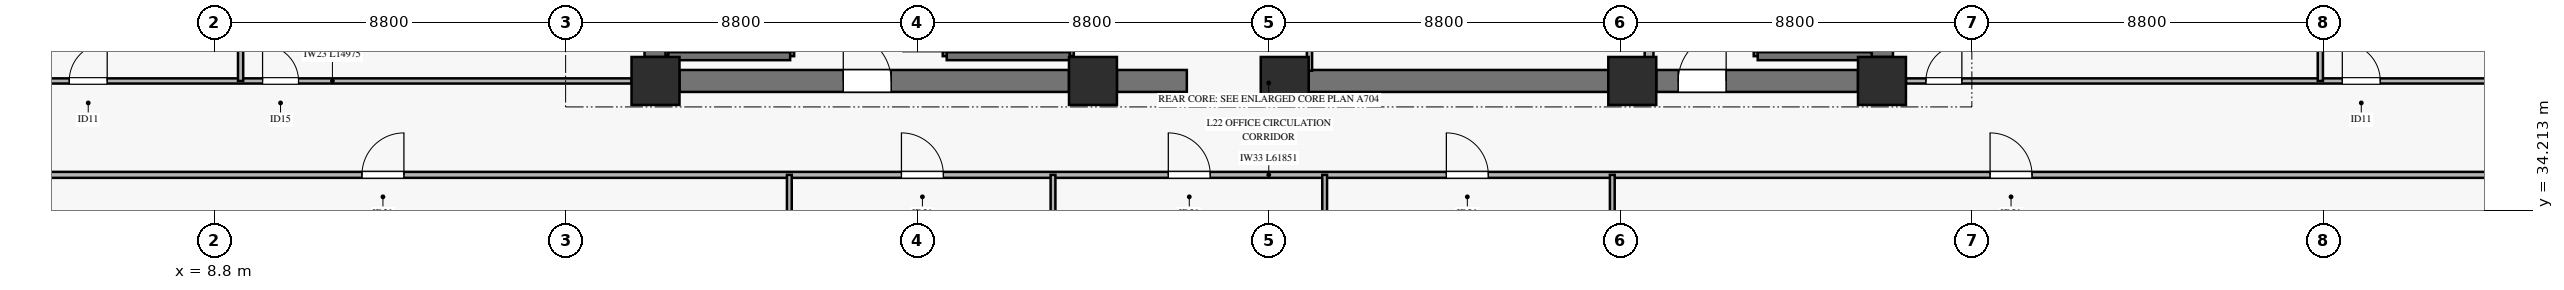
"""IFC4 building model, lengths in metres.
Left out: names, types, materials, properties, quantities, classifications, styles, units other than length and angle.
Written with IfcOpenShell. Run it as: python <this file> out.ifc"""

import sys

from ifc_helpers import new_model, si_unit, direction, frame, frame_2d, origin, origin_2d, place, context, subcontext, project, spatial, rectangle, extrude, source, transform, mapped, element, fill, save


model = new_model("IFC4")
c1 = context("Model", 3, precision=1e-05, world=origin(), true_north=direction((0.0, 1.0)))
c2 = subcontext(c1, "Body", "Model", "MODEL_VIEW")
j1 = project(units=[si_unit("LENGTHUNIT", "METRE"), si_unit("PLANEANGLEUNIT", "RADIAN")], contexts=[c1])
p1 = place(None, origin())
s1 = spatial("IfcSite", under=j1, at=p1, CompositionType="ELEMENT")
p2 = place(p1, origin())
s2 = spatial("IfcBuilding", under=s1, at=p2, CompositionType="ELEMENT")
p3 = place(p2, frame((0.0, 0.0, 91.3)))
s3 = spatial("IfcBuildingStorey", under=s2, at=p3, CompositionType="ELEMENT", Elevation=91.3)
m1 = source(origin(), c2, "Body", "SweptSolid", [
    extrude(rectangle(XDim=1.2, YDim=1.2, at=origin_2d()), origin(), (0.0, 0.0, 1.0), 3.62),
])
for number, where, z_axis, x_axis in (
    (1, (19.85, 37.45, 0.0), (0.0, 0.0, 1.0), (1.0, 0.0, 0.0)),
    (2, (30.8, 37.45, 0.0), (0.0, 0.0, 1.0), (1.0, 0.0, 0.0)),
    (3, (35.6, 37.45, 0.0), (0.0, 0.0, 1.0), (1.0, 0.0, 0.0)),
    (4, (44.3, 37.45, 0.0), (0.0, 0.0, 1.0), (1.0, 0.0, 0.0)),
    (5, (50.55, 37.45, 0.0), (0.0, 0.0, 1.0), (1.0, 0.0, 0.0)),
):
    element("IfcColumn", number, at=place(p3, frame(where, z_axis=z_axis, x_axis=x_axis)), inside=s3, PredefinedType="PILASTER", context=c2, shape_type="MappedRepresentation", body=[
        mapped(m1, transform((0.0, 0.0, 0.0), x_axis=(1.0, 0.0, 0.0), y_axis=(0.0, 1.0, 0.0), z_axis=(0.0, 0.0, 1.0), scale=1.0)),
    ])
p4 = place(p3, frame((20.45, 37.45, 0.0), z_axis=(0.0, 0.0, 1.0), x_axis=(1.0, 0.0, 0.0)))
e6 = element("IfcWall", 6, at=p4, inside=s3, PredefinedType="SHEAR", context=c2, shape_type="SweptSolid", body=[
    extrude(rectangle(XDim=9.75, YDim=0.55, at=frame_2d((4.875, 0.0))), origin(), (0.0, 0.0, 1.0), 3.62),
])
p5 = place(p4, frame((4.1, 0.0, 0.0)))
e7 = element("IfcOpeningElement", 7, at=p5, cuts=e6, PredefinedType="OPENING", context=c2, shape_type="SweptSolid", body=[
    extrude(rectangle(XDim=1.2, YDim=2.15, at=frame_2d((0.6, 1.075))), frame((0.0, 0.285, 0.0), z_axis=(0.0, -1.0, 0.0), x_axis=(1.0, 0.0, 0.0)), (0.0, 0.0, 1.0), 0.57),
])
p6 = place(p3, frame((31.4, 37.45, 0.0), z_axis=(0.0, 0.0, 1.0), x_axis=(1.0, 0.0, 0.0)))
e8 = element("IfcWall", 8, at=p6, inside=s3, PredefinedType="SHEAR", context=c2, shape_type="SweptSolid", body=[
    extrude(rectangle(XDim=1.75, YDim=0.55, at=frame_2d((0.875, 0.0))), origin(), (0.0, 0.0, 1.0), 3.62),
])
p7 = place(p3, frame((36.2, 37.45, 0.0), z_axis=(0.0, 0.0, 1.0), x_axis=(1.0, 0.0, 0.0)))
e9 = element("IfcWall", 9, at=p7, inside=s3, PredefinedType="SHEAR", context=c2, shape_type="SweptSolid", body=[
    extrude(rectangle(XDim=7.5, YDim=0.55, at=frame_2d((3.75, 0.0))), origin(), (0.0, 0.0, 1.0), 3.62),
])
p8 = place(p3, frame((44.9, 37.45, 0.0), z_axis=(0.0, 0.0, 1.0), x_axis=(1.0, 0.0, 0.0)))
e10 = element("IfcWall", 10, at=p8, inside=s3, PredefinedType="SHEAR", context=c2, shape_type="SweptSolid", body=[
    extrude(rectangle(XDim=5.05, YDim=0.55, at=frame_2d((2.525, 0.0))), origin(), (0.0, 0.0, 1.0), 3.62),
])
p9 = place(p8, frame((0.55, 0.0, 0.0)))
e11 = element("IfcOpeningElement", 11, at=p9, cuts=e10, PredefinedType="OPENING", context=c2, shape_type="SweptSolid", body=[
    extrude(rectangle(XDim=1.2, YDim=2.15, at=frame_2d((0.6, 1.075))), frame((0.0, 0.285, 0.0), z_axis=(0.0, -1.0, 0.0), x_axis=(1.0, 0.0, 0.0)), (0.0, 0.0, 1.0), 0.57),
])
for number, where, z_axis, x_axis in (
    (12, (19.85, 38.05, 0.0), (0.0, 0.0, 1.0), (0.0, 1.0, 0.0)),
    (13, (50.55, 38.05, 0.0), (0.0, 0.0, 1.0), (0.0, 1.0, 0.0)),
):
    element("IfcWall", number, at=place(p3, frame(where, z_axis=z_axis, x_axis=x_axis)), inside=s3, PredefinedType="SHEAR", context=c2, shape_type="SweptSolid", body=[
        extrude(rectangle(XDim=7.9, YDim=0.55, at=frame_2d((3.95, 0.0))), origin(), (0.0, 0.0, 1.0), 3.62),
    ])
p10 = place(p3, frame((20.17, 38.07, 0.0), z_axis=(0.0, 0.0, 1.0), x_axis=(0.0, 1.0, 0.0)))
e14 = element("IfcWall", 14, at=p10, inside=s3, PredefinedType="SOLIDWALL", context=c2, shape_type="SweptSolid", body=[
    extrude(rectangle(XDim=7.25, YDim=0.14, at=frame_2d((3.625, 0.0))), origin(), (0.0, 0.0, 1.0), 3.9),
])
p11 = place(p3, frame((23.22, 38.07, 0.0), z_axis=(0.0, 0.0, 1.0), x_axis=(0.0, 1.0, 0.0)))
e15 = element("IfcWall", 15, at=p11, inside=s3, PredefinedType="SOLIDWALL", context=c2, shape_type="SweptSolid", body=[
    extrude(rectangle(XDim=7.25, YDim=0.2, at=frame_2d((3.625, 0.0))), origin(), (0.0, 0.0, 1.0), 3.9),
])
p12 = place(p11, frame((0.11, 0.0, 0.0)))
e16 = element("IfcOpeningElement", 16, at=p12, cuts=e15, PredefinedType="OPENING", context=c2, shape_type="SweptSolid", body=[
    extrude(rectangle(XDim=1.1, YDim=2.15, at=frame_2d((0.55, 1.075))), frame((0.0, 0.11, 0.0), z_axis=(0.0, -1.0, 0.0), x_axis=(1.0, 0.0, 0.0)), (0.0, 0.0, 1.0), 0.22),
])
p13 = place(p3, frame((20.17, 38.07, 0.0), z_axis=(0.0, 0.0, 1.0), x_axis=(1.0, 0.0, 0.0)))
e17 = element("IfcWall", 17, at=p13, inside=s3, PredefinedType="SOLIDWALL", context=c2, shape_type="SweptSolid", body=[
    extrude(rectangle(XDim=3.05, YDim=0.2, at=frame_2d((1.525, 0.0))), origin(), (0.0, 0.0, 1.0), 3.9),
])
p14 = place(p3, frame((27.14, 38.07, 0.0), z_axis=(0.0, 0.0, 1.0), x_axis=(0.0, 1.0, 0.0)))
e18 = element("IfcWall", 18, at=p14, inside=s3, PredefinedType="SOLIDWALL", context=c2, shape_type="SweptSolid", body=[
    extrude(rectangle(XDim=7.25, YDim=0.2, at=frame_2d((3.625, 0.0))), origin(), (0.0, 0.0, 1.0), 3.9),
])
p15 = place(p14, frame((0.11, 0.0, 0.0)))
e19 = element("IfcOpeningElement", 19, at=p15, cuts=e18, PredefinedType="OPENING", context=c2, shape_type="SweptSolid", body=[
    extrude(rectangle(XDim=1.1, YDim=2.15, at=frame_2d((0.55, 1.075))), frame((0.0, 0.11, 0.0), z_axis=(0.0, -1.0, 0.0), x_axis=(1.0, 0.0, 0.0)), (0.0, 0.0, 1.0), 0.22),
])
p16 = place(p3, frame((30.22, 38.07, 0.0), z_axis=(0.0, 0.0, 1.0), x_axis=(0.0, 1.0, 0.0)))
e20 = element("IfcWall", 20, at=p16, inside=s3, PredefinedType="SOLIDWALL", context=c2, shape_type="SweptSolid", body=[
    extrude(rectangle(XDim=7.25, YDim=0.2, at=frame_2d((3.625, 0.0))), origin(), (0.0, 0.0, 1.0), 3.9),
])
p17 = place(p3, frame((27.14, 38.07, 0.0), z_axis=(0.0, 0.0, 1.0), x_axis=(1.0, 0.0, 0.0)))
e21 = element("IfcWall", 21, at=p17, inside=s3, PredefinedType="SOLIDWALL", context=c2, shape_type="SweptSolid", body=[
    extrude(rectangle(XDim=3.08, YDim=0.2, at=frame_2d((1.54, 0.0))), origin(), (0.0, 0.0, 1.0), 3.9),
])
p18 = place(p3, frame((47.44, 38.07, 0.0), z_axis=(0.0, 0.0, 1.0), x_axis=(0.0, 1.0, 0.0)))
e22 = element("IfcWall", 22, at=p18, inside=s3, PredefinedType="SOLIDWALL", context=c2, shape_type="SweptSolid", body=[
    extrude(rectangle(XDim=7.25, YDim=0.2, at=frame_2d((3.625, 0.0))), origin(), (0.0, 0.0, 1.0), 3.9),
])
p19 = place(p18, frame((0.11, 0.0, 0.0)))
e23 = element("IfcOpeningElement", 23, at=p19, cuts=e22, PredefinedType="OPENING", context=c2, shape_type="SweptSolid", body=[
    extrude(rectangle(XDim=1.1, YDim=2.15, at=frame_2d((0.55, 1.075))), frame((0.0, 0.11, 0.0), z_axis=(0.0, -1.0, 0.0), x_axis=(1.0, 0.0, 0.0)), (0.0, 0.0, 1.0), 0.22),
])
p20 = place(p3, frame((47.44, 38.07, 0.0), z_axis=(0.0, 0.0, 1.0), x_axis=(1.0, 0.0, 0.0)))
e24 = element("IfcWall", 24, at=p20, inside=s3, PredefinedType="SOLIDWALL", context=c2, shape_type="SweptSolid", body=[
    extrude(rectangle(XDim=2.855, YDim=0.2, at=frame_2d((1.427, 0.0))), origin(), (0.0, 0.0, 1.0), 3.9),
])
p21 = place(p3, frame((44.72, 37.705, 0.0), z_axis=(0.0, 0.0, 1.0), x_axis=(0.0, 1.0, 0.0)))
e25 = element("IfcWall", 25, at=p21, inside=s3, PredefinedType="SOLIDWALL", context=c2, shape_type="SweptSolid", body=[
    extrude(rectangle(XDim=7.515, YDim=0.22, at=frame_2d((3.757, 0.0))), origin(), (0.0, 0.0, 1.0), 3.62),
])
p22 = place(p3, frame((36.22, 37.705, 0.0), z_axis=(0.0, 0.0, 1.0), x_axis=(0.0, 1.0, 0.0)))
e26 = element("IfcWall", 26, at=p22, inside=s3, PredefinedType="PARTITIONING", context=c2, shape_type="SweptSolid", body=[
    extrude(rectangle(XDim=2.215, YDim=0.13, at=frame_2d((1.107, 0.0))), origin(), (0.0, 0.0, 1.0), 3.62),
])
p23 = place(p22, frame((0.905, 0.0, 0.0)))
e27 = element("IfcOpeningElement", 27, at=p23, cuts=e26, PredefinedType="OPENING", context=c2, shape_type="SweptSolid", body=[
    extrude(rectangle(XDim=0.9, YDim=2.1, at=frame_2d((0.45, 1.05))), frame((0.0, 0.075, 0.0), z_axis=(0.0, -1.0, 0.0), x_axis=(1.0, 0.0, 0.0)), (0.0, 0.0, 1.0), 0.15),
])
p24 = place(p3, frame((4.275, 35.1, 0.0), z_axis=(0.0, 0.0, 1.0), x_axis=(1.0, 0.0, 0.0)))
e28 = element("IfcWall", 28, at=p24, inside=s3, PredefinedType="PARTITIONING", context=c2, shape_type="SweptSolid", body=[
    extrude(rectangle(XDim=61.851, YDim=0.15, at=frame_2d((30.926, 0.0))), origin(), (0.0, 0.0, 1.0), 2.705),
])
p25 = place(p24, frame((8.227, 0.0, 0.0)))
e29 = element("IfcOpeningElement", 29, at=p25, cuts=e28, PredefinedType="OPENING", context=c2, shape_type="SweptSolid", body=[
    extrude(rectangle(XDim=1.05, YDim=2.15, at=frame_2d((0.525, 1.075))), frame((0.0, 0.085, 0.0), z_axis=(0.0, -1.0, 0.0), x_axis=(1.0, 0.0, 0.0)), (0.0, 0.0, 1.0), 0.17),
])
p26 = place(p24, frame((21.731, 0.0, 0.0)))
e30 = element("IfcOpeningElement", 30, at=p26, cuts=e28, PredefinedType="OPENING", context=c2, shape_type="SweptSolid", body=[
    extrude(rectangle(XDim=1.05, YDim=2.15, at=frame_2d((0.525, 1.075))), frame((0.0, 0.085, 0.0), z_axis=(0.0, -1.0, 0.0), x_axis=(1.0, 0.0, 0.0)), (0.0, 0.0, 1.0), 0.17),
])
p27 = place(p24, frame((28.411, 0.0, 0.0)))
e31 = element("IfcOpeningElement", 31, at=p27, cuts=e28, PredefinedType="OPENING", context=c2, shape_type="SweptSolid", body=[
    extrude(rectangle(XDim=1.05, YDim=2.15, at=frame_2d((0.525, 1.075))), frame((0.0, 0.085, 0.0), z_axis=(0.0, -1.0, 0.0), x_axis=(1.0, 0.0, 0.0)), (0.0, 0.0, 1.0), 0.17),
])
p28 = place(p24, frame((35.371, 0.0, 0.0)))
e32 = element("IfcOpeningElement", 32, at=p28, cuts=e28, PredefinedType="OPENING", context=c2, shape_type="SweptSolid", body=[
    extrude(rectangle(XDim=1.05, YDim=2.15, at=frame_2d((0.525, 1.075))), frame((0.0, 0.085, 0.0), z_axis=(0.0, -1.0, 0.0), x_axis=(1.0, 0.0, 0.0)), (0.0, 0.0, 1.0), 0.17),
])
p29 = place(p24, frame((48.981, 0.0, 0.0)))
e33 = element("IfcOpeningElement", 33, at=p29, cuts=e28, PredefinedType="OPENING", context=c2, shape_type="SweptSolid", body=[
    extrude(rectangle(XDim=1.05, YDim=2.15, at=frame_2d((0.525, 1.075))), frame((0.0, 0.085, 0.0), z_axis=(0.0, -1.0, 0.0), x_axis=(1.0, 0.0, 0.0)), (0.0, 0.0, 1.0), 0.17),
])
for number, where, z_axis, x_axis in (
    (34, (23.2, 5.936, 0.0), (0.0, 0.0, 1.0), (0.0, 1.0, 0.0)),
    (35, (29.8, 5.936, 0.0), (0.0, 0.0, 1.0), (0.0, 1.0, 0.0)),
    (36, (36.6, 5.936, 0.0), (0.0, 0.0, 1.0), (0.0, 1.0, 0.0)),
):
    element("IfcWall", number, at=place(p3, frame(where, z_axis=z_axis, x_axis=x_axis)), inside=s3, PredefinedType="PARTITIONING", context=c2, shape_type="SweptSolid", body=[
        extrude(rectangle(XDim=29.164, YDim=0.12, at=frame_2d((14.582, 0.0))), origin(), (0.0, 0.0, 1.0), 3.105),
    ])
p30 = place(p3, frame((43.8, 5.936, 0.0), z_axis=(0.0, 0.0, 1.0), x_axis=(0.0, 1.0, 0.0)))
e37 = element("IfcWall", 37, at=p30, inside=s3, PredefinedType="PARTITIONING", context=c2, shape_type="SweptSolid", body=[
    extrude(rectangle(XDim=29.164, YDim=0.12, at=frame_2d((14.582, 0.0))), origin(), (0.0, 0.0, 1.0), 3.155),
])
p31 = place(p3, frame((4.275, 37.45, 0.0), z_axis=(0.0, 0.0, 1.0), x_axis=(1.0, 0.0, 0.0)))
e38 = element("IfcWall", 38, at=p31, inside=s3, PredefinedType="PARTITIONING", context=c2, shape_type="SweptSolid", body=[
    extrude(rectangle(XDim=14.975, YDim=0.13, at=frame_2d((7.488, 0.0))), origin(), (0.0, 0.0, 1.0), 3.105),
])
p32 = place(p31, frame((0.9, 0.0, 0.0)))
e39 = element("IfcOpeningElement", 39, at=p32, cuts=e38, PredefinedType="OPENING", context=c2, shape_type="SweptSolid", body=[
    extrude(rectangle(XDim=0.95, YDim=2.1, at=frame_2d((0.475, 1.05))), frame((0.0, 0.075, 0.0), z_axis=(0.0, -1.0, 0.0), x_axis=(1.0, 0.0, 0.0)), (0.0, 0.0, 1.0), 0.15),
])
p33 = place(p31, frame((5.739, 0.0, 0.0)))
e40 = element("IfcOpeningElement", 40, at=p33, cuts=e38, PredefinedType="OPENING", context=c2, shape_type="SweptSolid", body=[
    extrude(rectangle(XDim=0.9, YDim=2.1, at=frame_2d((0.45, 1.05))), frame((0.0, 0.075, 0.0), z_axis=(0.0, -1.0, 0.0), x_axis=(1.0, 0.0, 0.0)), (0.0, 0.0, 1.0), 0.15),
])
p34 = place(p3, frame((9.464, 37.45, 0.0), z_axis=(0.0, 0.0, 1.0), x_axis=(0.0, 1.0, 0.0)))
e41 = element("IfcWall", 41, at=p34, inside=s3, PredefinedType="PARTITIONING", context=c2, shape_type="SweptSolid", body=[
    extrude(rectangle(XDim=8.8, YDim=0.13, at=frame_2d((4.4, 0.0))), origin(), (0.0, 0.0, 1.0), 3.62),
])
p35 = place(p3, frame((51.15, 37.45, 0.0), z_axis=(0.0, 0.0, 1.0), x_axis=(1.0, 0.0, 0.0)))
e42 = element("IfcWall", 42, at=p35, inside=s3, PredefinedType="PARTITIONING", context=c2, shape_type="SweptSolid", body=[
    extrude(rectangle(XDim=14.976, YDim=0.13, at=frame_2d((7.488, 0.0))), origin(), (0.0, 0.0, 1.0), 3.105),
])
p36 = place(p35, frame((0.5, 0.0, 0.0)))
e43 = element("IfcOpeningElement", 43, at=p36, cuts=e42, PredefinedType="OPENING", context=c2, shape_type="SweptSolid", body=[
    extrude(rectangle(XDim=0.9, YDim=2.1, at=frame_2d((0.45, 1.05))), frame((0.0, 0.075, 0.0), z_axis=(0.0, -1.0, 0.0), x_axis=(1.0, 0.0, 0.0)), (0.0, 0.0, 1.0), 0.15),
])
p37 = place(p35, frame((10.923, 0.0, 0.0)))
e44 = element("IfcOpeningElement", 44, at=p37, cuts=e42, PredefinedType="OPENING", context=c2, shape_type="SweptSolid", body=[
    extrude(rectangle(XDim=0.95, YDim=2.1, at=frame_2d((0.475, 1.05))), frame((0.0, 0.075, 0.0), z_axis=(0.0, -1.0, 0.0), x_axis=(1.0, 0.0, 0.0)), (0.0, 0.0, 1.0), 0.15),
])
p38 = place(p3, frame((61.523, 37.45, 0.0), z_axis=(0.0, 0.0, 1.0), x_axis=(0.0, 1.0, 0.0)))
e45 = element("IfcWall", 45, at=p38, inside=s3, PredefinedType="PARTITIONING", context=c2, shape_type="SweptSolid", body=[
    extrude(rectangle(XDim=8.8, YDim=0.13, at=frame_2d((4.4, 0.0))), origin(), (0.0, 0.0, 1.0), 3.62),
])
m2 = source(origin(), c2, "Body", "SweptSolid", [
    extrude(rectangle(XDim=1.2, YDim=2.15, at=frame_2d((0.6, 1.075))), frame((0.0, 0.025, 0.0), z_axis=(0.0, -1.0, 0.0), x_axis=(1.0, 0.0, 0.0)), (0.0, 0.0, 1.0), 0.05),
])
p39 = place(p5, origin())
e46 = element("IfcDoor", 46, at=p39, inside=s3, OperationType="SINGLE_SWING_LEFT", PredefinedType="DOOR", context=c2, shape_type="MappedRepresentation", body=[
    mapped(m2, transform((0.0, 0.0, 0.0), x_axis=(1.0, 0.0, 0.0), y_axis=(0.0, 1.0, 0.0), z_axis=(0.0, 0.0, 1.0), scale=1.0)),
])
fill(e7, e46)
p40 = place(p9, origin())
e47 = element("IfcDoor", 47, at=p40, inside=s3, OperationType="SINGLE_SWING_RIGHT", PredefinedType="DOOR", context=c2, shape_type="MappedRepresentation", body=[
    mapped(m2, transform((0.0, 0.0, 0.0), x_axis=(1.0, 0.0, 0.0), y_axis=(0.0, 1.0, 0.0), z_axis=(0.0, 0.0, 1.0), scale=1.0)),
])
fill(e11, e47)
m3 = source(origin(), c2, "Body", "SweptSolid", [
    extrude(rectangle(XDim=1.05, YDim=2.15, at=frame_2d((0.525, 1.075))), frame((0.0, 0.025, 0.0), z_axis=(0.0, -1.0, 0.0), x_axis=(1.0, 0.0, 0.0)), (0.0, 0.0, 1.0), 0.05),
])
p41 = place(p25, origin())
e48 = element("IfcDoor", 48, at=p41, inside=s3, OperationType="SINGLE_SWING_RIGHT", PredefinedType="DOOR", context=c2, shape_type="MappedRepresentation", body=[
    mapped(m3, transform((0.0, 0.0, 0.0), x_axis=(1.0, 0.0, 0.0), y_axis=(0.0, 1.0, 0.0), z_axis=(0.0, 0.0, 1.0), scale=1.0)),
])
fill(e29, e48)
p42 = place(p26, origin())
e49 = element("IfcDoor", 49, at=p42, inside=s3, OperationType="SINGLE_SWING_LEFT", PredefinedType="DOOR", context=c2, shape_type="MappedRepresentation", body=[
    mapped(m3, transform((0.0, 0.0, 0.0), x_axis=(1.0, 0.0, 0.0), y_axis=(0.0, 1.0, 0.0), z_axis=(0.0, 0.0, 1.0), scale=1.0)),
])
fill(e30, e49)
p43 = place(p27, origin())
e50 = element("IfcDoor", 50, at=p43, inside=s3, OperationType="SINGLE_SWING_LEFT", PredefinedType="DOOR", context=c2, shape_type="MappedRepresentation", body=[
    mapped(m3, transform((0.0, 0.0, 0.0), x_axis=(1.0, 0.0, 0.0), y_axis=(0.0, 1.0, 0.0), z_axis=(0.0, 0.0, 1.0), scale=1.0)),
])
fill(e31, e50)
p44 = place(p28, origin())
e51 = element("IfcDoor", 51, at=p44, inside=s3, OperationType="SINGLE_SWING_LEFT", PredefinedType="DOOR", context=c2, shape_type="MappedRepresentation", body=[
    mapped(m3, transform((0.0, 0.0, 0.0), x_axis=(1.0, 0.0, 0.0), y_axis=(0.0, 1.0, 0.0), z_axis=(0.0, 0.0, 1.0), scale=1.0)),
])
fill(e32, e51)
p45 = place(p29, origin())
e52 = element("IfcDoor", 52, at=p45, inside=s3, OperationType="SINGLE_SWING_LEFT", PredefinedType="DOOR", context=c2, shape_type="MappedRepresentation", body=[
    mapped(m3, transform((0.0, 0.0, 0.0), x_axis=(1.0, 0.0, 0.0), y_axis=(0.0, 1.0, 0.0), z_axis=(0.0, 0.0, 1.0), scale=1.0)),
])
fill(e33, e52)
m4 = source(origin(), c2, "Body", "SweptSolid", [
    extrude(rectangle(XDim=0.95, YDim=2.1, at=frame_2d((0.475, 1.05))), frame((0.0, 0.025, 0.0), z_axis=(0.0, -1.0, 0.0), x_axis=(1.0, 0.0, 0.0)), (0.0, 0.0, 1.0), 0.05),
])
p46 = place(p32, origin())
e53 = element("IfcDoor", 53, at=p46, inside=s3, OperationType="SINGLE_SWING_RIGHT", PredefinedType="DOOR", context=c2, shape_type="MappedRepresentation", body=[
    mapped(m4, transform((0.0, 0.0, 0.0), x_axis=(1.0, 0.0, 0.0), y_axis=(0.0, 1.0, 0.0), z_axis=(0.0, 0.0, 1.0), scale=1.0)),
])
fill(e39, e53)
m5 = source(origin(), c2, "Body", "SweptSolid", [
    extrude(rectangle(XDim=0.9, YDim=2.1, at=frame_2d((0.45, 1.05))), frame((0.0, 0.025, 0.0), z_axis=(0.0, -1.0, 0.0), x_axis=(1.0, 0.0, 0.0)), (0.0, 0.0, 1.0), 0.05),
])
p47 = place(p33, origin())
e54 = element("IfcDoor", 54, at=p47, inside=s3, OperationType="SINGLE_SWING_LEFT", PredefinedType="DOOR", context=c2, shape_type="MappedRepresentation", body=[
    mapped(m5, transform((0.0, 0.0, 0.0), x_axis=(1.0, 0.0, 0.0), y_axis=(0.0, 1.0, 0.0), z_axis=(0.0, 0.0, 1.0), scale=1.0)),
])
fill(e40, e54)
p48 = place(p36, origin())
e55 = element("IfcDoor", 55, at=p48, inside=s3, OperationType="SINGLE_SWING_RIGHT", PredefinedType="DOOR", context=c2, shape_type="MappedRepresentation", body=[
    mapped(m5, transform((0.0, 0.0, 0.0), x_axis=(1.0, 0.0, 0.0), y_axis=(0.0, 1.0, 0.0), z_axis=(0.0, 0.0, 1.0), scale=1.0)),
])
fill(e43, e55)
p49 = place(p37, origin())
e56 = element("IfcDoor", 56, at=p49, inside=s3, OperationType="SINGLE_SWING_LEFT", PredefinedType="DOOR", context=c2, shape_type="MappedRepresentation", body=[
    mapped(m4, transform((0.0, 0.0, 0.0), x_axis=(1.0, 0.0, 0.0), y_axis=(0.0, 1.0, 0.0), z_axis=(0.0, 0.0, 1.0), scale=1.0)),
])
fill(e44, e56)
save(model, sys.argv[1])
